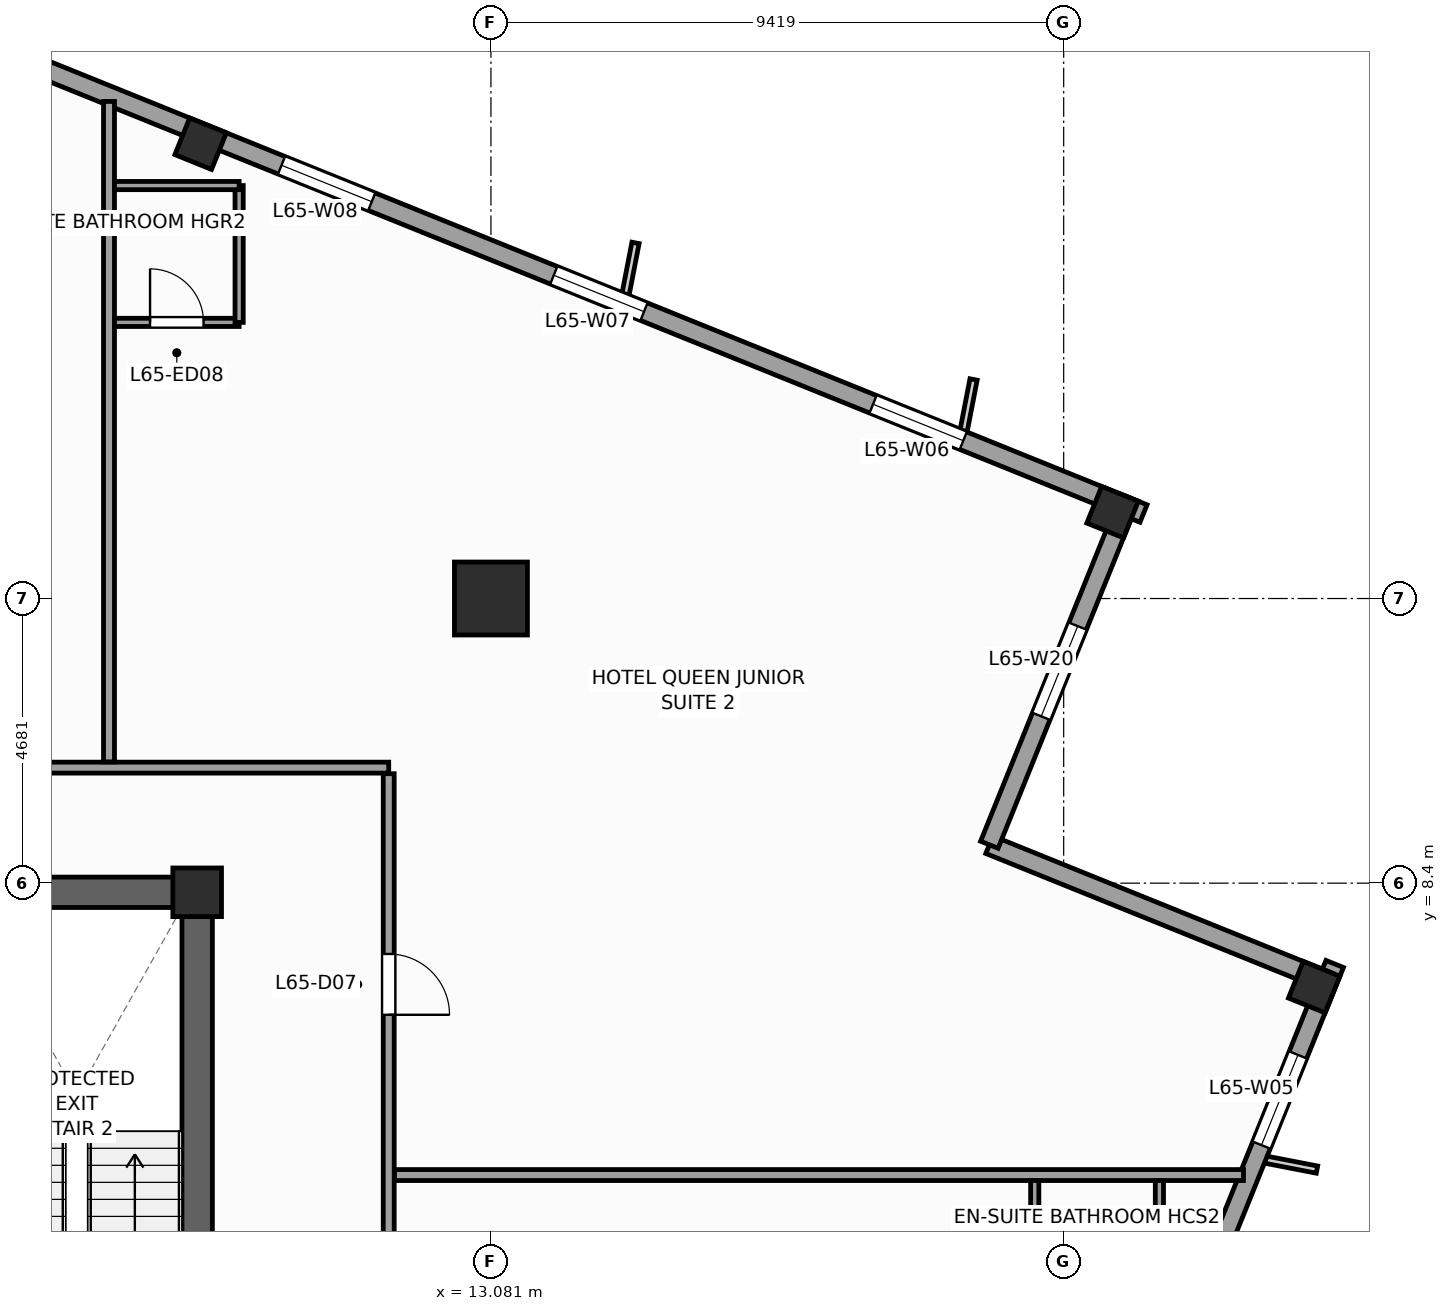
"""IFC4 building model, lengths in metres.
Left out: names, types, materials, properties, quantities, classifications, styles, units other than length and angle.
Written with IfcOpenShell. Run it as: python <this file> out.ifc"""

import sys

from ifc_helpers import new_model, si_unit, direction, frame, frame_2d, origin, origin_2d, place, context, subcontext, project, spatial, rectangle, extrude, source, transform, mapped, element, fill, save


model = new_model("IFC4")
c1 = context("Model", 3, precision=1e-05, world=origin(), true_north=direction((0.0, 1.0)))
c2 = subcontext(c1, "Body", "Model", "MODEL_VIEW")
j1 = project(units=[si_unit("LENGTHUNIT", "METRE"), si_unit("PLANEANGLEUNIT", "RADIAN")], contexts=[c1])
p1 = place(None, origin())
s1 = spatial("IfcSite", under=j1, at=p1, CompositionType="ELEMENT")
p2 = place(p1, origin())
s2 = spatial("IfcBuilding", under=s1, at=p2, CompositionType="ELEMENT")
p3 = place(p2, frame((0.0, 0.0, 268.8)))
s3 = spatial("IfcBuildingStorey", under=s2, at=p3, CompositionType="ELEMENT", Elevation=268.8)
p4 = place(p3, frame((-8.5, 8.25, 0.0), z_axis=(0.0, 0.0, 1.0), x_axis=(1.0, 0.0, 0.0)))
e1 = element("IfcWall", 1, at=p4, inside=s3, PredefinedType="SHEAR", context=c2, shape_type="SweptSolid", body=[
    extrude(rectangle(XDim=17.0, YDim=0.5, at=frame_2d((8.5, 0.0))), origin(), (0.0, 0.0, 1.0), 3.6),
])
p5 = place(p3, frame((8.25, -8.0, 0.0), z_axis=(0.0, 0.0, 1.0), x_axis=(0.0, 1.0, 0.0)))
e2 = element("IfcWall", 2, at=p5, inside=s3, PredefinedType="SHEAR", context=c2, shape_type="SweptSolid", body=[
    extrude(rectangle(XDim=16.0, YDim=0.5, at=frame_2d((8.0, 0.0))), origin(), (0.0, 0.0, 1.0), 3.6),
])
p6 = place(p5, frame((4.69, 0.0, 0.0)))
e3 = element("IfcOpeningElement", 3, at=p6, cuts=e2, PredefinedType="OPENING", context=c2, shape_type="SweptSolid", body=[
    extrude(rectangle(XDim=1.3, YDim=2.2, at=frame_2d((0.65, 1.1))), frame((0.0, 0.26, 0.0), z_axis=(0.0, -1.0, 0.0), x_axis=(1.0, 0.0, 0.0)), (0.0, 0.0, 1.0), 0.52),
])
m1 = source(origin(), c2, "Body", "SweptSolid", [
    extrude(rectangle(XDim=0.8, YDim=0.8, at=origin_2d()), origin(), (0.0, 0.0, 1.0), 3.6),
])
p7 = place(p3, frame((8.25, 8.25, 0.0), z_axis=(0.0, 0.0, 1.0), x_axis=(1.0, 0.0, 0.0)))
e4 = element("IfcColumn", 4, at=p7, inside=s3, PredefinedType="PILASTER", context=c2, shape_type="MappedRepresentation", body=[
    mapped(m1, transform((0.0, 0.0, 0.0), scale=1.0)),
])
m2 = source(origin(), c2, "Body", "SweptSolid", [
    extrude(rectangle(XDim=1.2, YDim=1.2, at=origin_2d()), origin(), (0.0, 0.0, 1.0), 3.6),
])
p8 = place(p3, frame((13.081, 13.081, 0.0), z_axis=(0.0, 0.0, 1.0), x_axis=(1.0, 0.0, 0.0)))
e5 = element("IfcColumn", 5, at=p8, inside=s3, PredefinedType="COLUMN", context=c2, shape_type="MappedRepresentation", body=[
    mapped(m2, transform((0.0, 0.0, 0.0), scale=1.0)),
])
m3 = source(origin(), c2, "Body", "SweptSolid", [
    extrude(rectangle(XDim=0.65, YDim=0.65, at=origin_2d()), origin(), (0.0, 0.0, 1.0), 3.6),
])
for number, where, z_axis, x_axis in (
    (6, (26.62, 6.69, 0.0), (0.0, 0.0, 1.0), (0.375, 0.927, 0.0)),
    (7, (23.304, 14.501, 0.0), (0.0, 0.0, 1.0), (0.375, 0.927, 0.0)),
    (8, (8.307, 20.56, 0.0), (0.0, 0.0, 1.0), (0.375, 0.927, 0.0)),
):
    element("IfcColumn", number, at=place(p3, frame(where, z_axis=z_axis, x_axis=x_axis)), inside=s3, PredefinedType="COLUMN", context=c2, shape_type="MappedRepresentation", body=[
        mapped(m3, transform((0.0, 0.0, 0.0), scale=1.0)),
    ])
p9 = place(p3, frame((14.479, -23.813, 0.0), z_axis=(0.0, 0.0, 1.0), x_axis=(0.374609557019, 0.927182657188, 0.0)))
e9 = element("IfcWall", 9, at=p9, inside=s3, PredefinedType="STANDARD", context=c2, shape_type="SweptSolid", body=[
    extrude(rectangle(XDim=33.31, YDim=0.31, at=frame_2d((16.655, 0.0))), origin(), (0.0, 0.0, 1.0), 2.75),
])
p10 = place(p9, frame((22.58, 0.0, 0.0)))
e10 = element("IfcOpeningElement", 10, at=p10, cuts=e9, PredefinedType="OPENING", context=c2, shape_type="SweptSolid", body=[
    extrude(rectangle(XDim=1.05, YDim=2.25, at=frame_2d((0.525, 1.125))), frame((0.0, 0.165, 0.0), z_axis=(0.0, -1.0, 0.0), x_axis=(1.0, 0.0, 0.0)), (0.0, 0.0, 1.0), 0.33),
])
p11 = place(p9, frame((3.197, 0.0, 0.47)))
e11 = element("IfcOpeningElement", 11, at=p11, cuts=e9, PredefinedType="OPENING", context=c2, shape_type="SweptSolid", body=[
    extrude(rectangle(XDim=1.6, YDim=2.1, at=frame_2d((0.8, 1.05))), frame((0.0, 0.165, 0.0), z_axis=(0.0, -1.0, 0.0), x_axis=(1.0, 0.0, 0.0)), (0.0, 0.0, 1.0), 0.33),
])
p12 = place(p9, frame((8.86, 0.0, 0.47)))
e12 = element("IfcOpeningElement", 12, at=p12, cuts=e9, PredefinedType="OPENING", context=c2, shape_type="SweptSolid", body=[
    extrude(rectangle(XDim=1.6, YDim=2.1, at=frame_2d((0.8, 1.05))), frame((0.0, 0.165, 0.0), z_axis=(0.0, -1.0, 0.0), x_axis=(1.0, 0.0, 0.0)), (0.0, 0.0, 1.0), 0.33),
])
p13 = place(p9, frame((14.439, 0.0, 0.47)))
e13 = element("IfcOpeningElement", 13, at=p13, cuts=e9, PredefinedType="OPENING", context=c2, shape_type="SweptSolid", body=[
    extrude(rectangle(XDim=1.6, YDim=2.1, at=frame_2d((0.8, 1.05))), frame((0.0, 0.165, 0.0), z_axis=(0.0, -1.0, 0.0), x_axis=(1.0, 0.0, 0.0)), (0.0, 0.0, 1.0), 0.33),
])
p14 = place(p9, frame((19.601, 0.0, 0.47)))
e14 = element("IfcOpeningElement", 14, at=p14, cuts=e9, PredefinedType="OPENING", context=c2, shape_type="SweptSolid", body=[
    extrude(rectangle(XDim=1.6, YDim=2.1, at=frame_2d((0.8, 1.05))), frame((0.0, 0.165, 0.0), z_axis=(0.0, -1.0, 0.0), x_axis=(1.0, 0.0, 0.0)), (0.0, 0.0, 1.0), 0.33),
])
p15 = place(p9, frame((30.097, 0.0, 0.47)))
e15 = element("IfcOpeningElement", 15, at=p15, cuts=e9, PredefinedType="OPENING", context=c2, shape_type="SweptSolid", body=[
    extrude(rectangle(XDim=1.6, YDim=2.1, at=frame_2d((0.8, 1.05))), frame((0.0, 0.165, 0.0), z_axis=(0.0, -1.0, 0.0), x_axis=(1.0, 0.0, 0.0)), (0.0, 0.0, 1.0), 0.33),
])
p16 = place(p3, frame((26.841, 6.784, 0.0), z_axis=(0.0, 0.0, 1.0), x_axis=(-0.927171722085, 0.374636620962, 0.0)))
e16 = element("IfcWall", 16, at=p16, inside=s3, PredefinedType="STANDARD", context=c2, shape_type="SweptSolid", body=[
    extrude(rectangle(XDim=6.0, YDim=0.31, at=frame_2d((3.0, 0.0))), origin(), (0.0, 0.0, 1.0), 2.65),
])
p17 = place(p3, frame((21.278, 9.032, 0.0), z_axis=(0.0, 0.0, 1.0), x_axis=(0.374602739196, 0.927185411764, 0.0)))
e17 = element("IfcWall", 17, at=p17, inside=s3, PredefinedType="STANDARD", context=c2, shape_type="SweptSolid", body=[
    extrude(rectangle(XDim=6.155, YDim=0.31, at=frame_2d((3.078, 0.0))), origin(), (0.0, 0.0, 1.0), 3.35),
])
p18 = place(p17, frame((2.278, 0.0, 0.47)))
e18 = element("IfcOpeningElement", 18, at=p18, cuts=e17, PredefinedType="OPENING", context=c2, shape_type="SweptSolid", body=[
    extrude(rectangle(XDim=1.6, YDim=2.1, at=frame_2d((0.8, 1.05))), frame((0.0, 0.165, 0.0), z_axis=(0.0, -1.0, 0.0), x_axis=(1.0, 0.0, 0.0)), (0.0, 0.0, 1.0), 0.33),
])
p19 = place(p3, frame((23.813, 14.479, 0.0), z_axis=(0.0, 0.0, 1.0), x_axis=(-0.927182657188, 0.374609557019, 0.0)))
e19 = element("IfcWall", 19, at=p19, inside=s3, PredefinedType="STANDARD", context=c2, shape_type="SweptSolid", body=[
    extrude(rectangle(XDim=33.31, YDim=0.31, at=frame_2d((16.655, 0.0))), origin(), (0.0, 0.0, 1.0), 2.75),
])
p20 = place(p19, frame((3.197, 0.0, 0.47)))
e20 = element("IfcOpeningElement", 20, at=p20, cuts=e19, PredefinedType="OPENING", context=c2, shape_type="SweptSolid", body=[
    extrude(rectangle(XDim=1.6, YDim=2.1, at=frame_2d((0.8, 1.05))), frame((0.0, 0.165, 0.0), z_axis=(0.0, -1.0, 0.0), x_axis=(1.0, 0.0, 0.0)), (0.0, 0.0, 1.0), 0.33),
])
p21 = place(p19, frame((8.86, 0.0, 0.47)))
e21 = element("IfcOpeningElement", 21, at=p21, cuts=e19, PredefinedType="OPENING", context=c2, shape_type="SweptSolid", body=[
    extrude(rectangle(XDim=1.6, YDim=2.1, at=frame_2d((0.8, 1.05))), frame((0.0, 0.165, 0.0), z_axis=(0.0, -1.0, 0.0), x_axis=(1.0, 0.0, 0.0)), (0.0, 0.0, 1.0), 0.33),
])
p22 = place(p19, frame((13.689, 0.0, 0.47)))
e22 = element("IfcOpeningElement", 22, at=p22, cuts=e19, PredefinedType="OPENING", context=c2, shape_type="SweptSolid", body=[
    extrude(rectangle(XDim=1.6, YDim=2.1, at=frame_2d((0.8, 1.05))), frame((0.0, 0.165, 0.0), z_axis=(0.0, -1.0, 0.0), x_axis=(1.0, 0.0, 0.0)), (0.0, 0.0, 1.0), 0.33),
])
p23 = place(p19, frame((21.851, 0.0, 0.47)))
e23 = element("IfcOpeningElement", 23, at=p23, cuts=e19, PredefinedType="OPENING", context=c2, shape_type="SweptSolid", body=[
    extrude(rectangle(XDim=1.6, YDim=2.1, at=frame_2d((0.8, 1.05))), frame((0.0, 0.165, 0.0), z_axis=(0.0, -1.0, 0.0), x_axis=(1.0, 0.0, 0.0)), (0.0, 0.0, 1.0), 0.33),
])
p24 = place(p19, frame((27.847, 0.0, 0.47)))
e24 = element("IfcOpeningElement", 24, at=p24, cuts=e19, PredefinedType="OPENING", context=c2, shape_type="SweptSolid", body=[
    extrude(rectangle(XDim=1.6, YDim=2.1, at=frame_2d((0.8, 1.05))), frame((0.0, 0.165, 0.0), z_axis=(0.0, -1.0, 0.0), x_axis=(1.0, 0.0, 0.0)), (0.0, 0.0, 1.0), 0.33),
])
p25 = place(p3, frame((-10.3, 10.3, 0.0), z_axis=(0.0, 0.0, 1.0), x_axis=(1.0, 0.0, 0.0)))
e25 = element("IfcWall", 25, at=p25, inside=s3, PredefinedType="PARTITIONING", context=c2, shape_type="SweptSolid", body=[
    extrude(rectangle(XDim=21.7, YDim=0.18, at=frame_2d((10.85, 0.0))), origin(), (0.0, 0.0, 1.0), 3.35),
])
p26 = place(p25, frame((9.8, 0.0, 0.0)))
e26 = element("IfcOpeningElement", 26, at=p26, cuts=e25, PredefinedType="OPENING", context=c2, shape_type="SweptSolid", body=[
    extrude(rectangle(XDim=1.0, YDim=2.15, at=frame_2d((0.5, 1.075))), frame((0.0, 0.1, 0.0), z_axis=(0.0, -1.0, 0.0), x_axis=(1.0, 0.0, 0.0)), (0.0, 0.0, 1.0), 0.2),
])
p27 = place(p3, frame((11.4, -11.3, 0.0), z_axis=(0.0, 0.0, 1.0), x_axis=(0.0, 1.0, 0.0)))
e27 = element("IfcWall", 27, at=p27, inside=s3, PredefinedType="PARTITIONING", context=c2, shape_type="SweptSolid", body=[
    extrude(rectangle(XDim=21.5, YDim=0.18, at=frame_2d((10.75, 0.0))), origin(), (0.0, 0.0, 1.0), 3.35),
])
p28 = place(p27, frame((17.536, 0.0, 0.0)))
e28 = element("IfcOpeningElement", 28, at=p28, cuts=e27, PredefinedType="OPENING", context=c2, shape_type="SweptSolid", body=[
    extrude(rectangle(XDim=1.0, YDim=2.15, at=frame_2d((0.5, 1.075))), frame((0.0, 0.1, 0.0), z_axis=(0.0, -1.0, 0.0), x_axis=(1.0, 0.0, 0.0)), (0.0, 0.0, 1.0), 0.2),
])
p29 = place(p27, frame((10.8, 0.0, 0.0)))
e29 = element("IfcOpeningElement", 29, at=p29, cuts=e27, PredefinedType="OPENING", context=c2, shape_type="SweptSolid", body=[
    extrude(rectangle(XDim=1.0, YDim=2.15, at=frame_2d((0.5, 1.075))), frame((0.0, 0.1, 0.0), z_axis=(0.0, -1.0, 0.0), x_axis=(1.0, 0.0, 0.0)), (0.0, 0.0, 1.0), 0.2),
])
p30 = place(p27, frame((5.4, 0.0, 0.0)))
e30 = element("IfcOpeningElement", 30, at=p30, cuts=e27, PredefinedType="OPENING", context=c2, shape_type="SweptSolid", body=[
    extrude(rectangle(XDim=1.0, YDim=2.15, at=frame_2d((0.5, 1.075))), frame((0.0, 0.1, 0.0), z_axis=(0.0, -1.0, 0.0), x_axis=(1.0, 0.0, 0.0)), (0.0, 0.0, 1.0), 0.2),
])
p31 = place(p3, frame((6.8, 10.395, 0.0), z_axis=(0.0, 0.0, 1.0), x_axis=(0.0, 1.0, 0.0)))
e31 = element("IfcWall", 31, at=p31, inside=s3, PredefinedType="PARTITIONING", context=c2, shape_type="SweptSolid", body=[
    extrude(rectangle(XDim=10.86, YDim=0.18, at=frame_2d((5.43, 0.0))), origin(), (0.0, 0.0, 1.0), 3.35),
])
p32 = place(p3, frame((11.495, 3.6, 0.0), z_axis=(0.0, 0.0, 1.0), x_axis=(1.0, 0.0, 0.0)))
e32 = element("IfcWall", 32, at=p32, inside=s3, PredefinedType="PARTITIONING", context=c2, shape_type="SweptSolid", body=[
    extrude(rectangle(XDim=13.962, YDim=0.18, at=frame_2d((6.981, 0.0))), origin(), (0.0, 0.0, 1.0), 3.35),
])
p33 = place(p3, frame((6.89, 17.622, 0.0), z_axis=(0.0, 0.0, 1.0), x_axis=(1.0, 0.0, 0.0)))
e33 = element("IfcWall", 33, at=p33, inside=s3, PredefinedType="PARTITIONING", context=c2, shape_type="SweptSolid", body=[
    extrude(rectangle(XDim=2.05, YDim=0.135, at=frame_2d((1.025, 0.0))), origin(), (0.0, 0.0, 1.0), 2.95),
])
p34 = place(p33, frame((0.585, 0.0, 0.0)))
e34 = element("IfcOpeningElement", 34, at=p34, cuts=e33, PredefinedType="OPENING", context=c2, shape_type="SweptSolid", body=[
    extrude(rectangle(XDim=0.88, YDim=2.1, at=frame_2d((0.44, 1.05))), frame((0.0, 0.078, 0.0), z_axis=(0.0, -1.0, 0.0), x_axis=(1.0, 0.0, 0.0)), (0.0, 0.0, 1.0), 0.155),
])
p35 = place(p3, frame((8.94, 17.622, 0.0), z_axis=(0.0, 0.0, 1.0), x_axis=(0.0, 1.0, 0.0)))
e35 = element("IfcWall", 35, at=p35, inside=s3, PredefinedType="PARTITIONING", context=c2, shape_type="SweptSolid", body=[
    extrude(rectangle(XDim=2.25, YDim=0.135, at=frame_2d((1.125, 0.0))), origin(), (0.0, 0.0, 1.0), 3.35),
])
p36 = place(p3, frame((6.89, 19.872, 0.0), z_axis=(0.0, 0.0, 1.0), x_axis=(1.0, 0.0, 0.0)))
e36 = element("IfcWall", 36, at=p36, inside=s3, PredefinedType="PARTITIONING", context=c2, shape_type="SweptSolid", body=[
    extrude(rectangle(XDim=2.05, YDim=0.135, at=frame_2d((1.025, 0.0))), origin(), (0.0, 0.0, 1.0), 3.35),
])
for number, where, z_axis, x_axis in (
    (37, (24.074, 1.26, 0.0), (0.0, 0.0, 1.0), (0.0, 1.0, 0.0)),
    (38, (22.024, 1.26, 0.0), (0.0, 0.0, 1.0), (0.0, 1.0, 0.0)),
):
    element("IfcWall", number, at=place(p3, frame(where, z_axis=z_axis, x_axis=x_axis)), inside=s3, PredefinedType="PARTITIONING", context=c2, shape_type="SweptSolid", body=[
        extrude(rectangle(XDim=2.25, YDim=0.135, at=frame_2d((1.125, 0.0))), origin(), (0.0, 0.0, 1.0), 3.35),
    ])
m4 = source(origin(), c2, "Body", "SweptSolid", [
    extrude(rectangle(XDim=1.6, YDim=2.1, at=frame_2d((0.8, 1.05))), frame((0.0, 0.03, 0.0), z_axis=(0.0, -1.0, 0.0), x_axis=(1.0, 0.0, 0.0)), (0.0, 0.0, 1.0), 0.06),
])
p37 = place(p15, origin())
e39 = element("IfcWindow", 39, at=p37, inside=s3, PartitioningType="SINGLE_PANEL", PredefinedType="WINDOW", context=c2, shape_type="MappedRepresentation", body=[
    mapped(m4, transform((0.0, 0.0, 0.0), scale=1.0)),
])
fill(e15, e39)
p38 = place(p20, origin())
e40 = element("IfcWindow", 40, at=p38, inside=s3, PartitioningType="SINGLE_PANEL", PredefinedType="WINDOW", context=c2, shape_type="MappedRepresentation", body=[
    mapped(m4, transform((0.0, 0.0, 0.0), scale=1.0)),
])
fill(e20, e40)
p39 = place(p21, origin())
e41 = element("IfcWindow", 41, at=p39, inside=s3, PartitioningType="SINGLE_PANEL", PredefinedType="WINDOW", context=c2, shape_type="MappedRepresentation", body=[
    mapped(m4, transform((0.0, 0.0, 0.0), scale=1.0)),
])
fill(e21, e41)
p40 = place(p22, origin())
e42 = element("IfcWindow", 42, at=p40, inside=s3, PartitioningType="SINGLE_PANEL", PredefinedType="WINDOW", context=c2, shape_type="MappedRepresentation", body=[
    mapped(m4, transform((0.0, 0.0, 0.0), scale=1.0)),
])
fill(e22, e42)
p41 = place(p18, origin())
e43 = element("IfcWindow", 43, at=p41, inside=s3, PartitioningType="SINGLE_PANEL", PredefinedType="WINDOW", context=c2, shape_type="MappedRepresentation", body=[
    mapped(m4, transform((0.0, 0.0, 0.0), scale=1.0)),
])
fill(e18, e43)
m5 = source(origin(), c2, "Body", "SweptSolid", [
    extrude(rectangle(XDim=1.0, YDim=2.15, at=frame_2d((0.5, 1.075))), frame((0.0, 0.025, 0.0), z_axis=(0.0, -1.0, 0.0), x_axis=(1.0, 0.0, 0.0)), (0.0, 0.0, 1.0), 0.05),
])
p42 = place(p28, frame((1.0, 0.0, 0.0), z_axis=(0.0, 0.0, 1.0), x_axis=(-1.0, 0.0, 0.0)))
e44 = element("IfcDoor", 44, at=p42, inside=s3, OperationType="SINGLE_SWING_LEFT", PredefinedType="DOOR", context=c2, shape_type="MappedRepresentation", body=[
    mapped(m5, transform((0.0, 0.0, 0.0), scale=1.0)),
])
fill(e28, e44)
m6 = source(origin(), c2, "Body", "SweptSolid", [
    extrude(rectangle(XDim=0.88, YDim=2.1, at=frame_2d((0.44, 1.05))), frame((0.0, 0.025, 0.0), z_axis=(0.0, -1.0, 0.0), x_axis=(1.0, 0.0, 0.0)), (0.0, 0.0, 1.0), 0.05),
])
p43 = place(p34, origin())
e45 = element("IfcDoor", 45, at=p43, inside=s3, OperationType="SINGLE_SWING_LEFT", PredefinedType="DOOR", context=c2, shape_type="MappedRepresentation", body=[
    mapped(m6, transform((0.0, 0.0, 0.0), scale=1.0)),
])
fill(e34, e45)
save(model, sys.argv[1])
